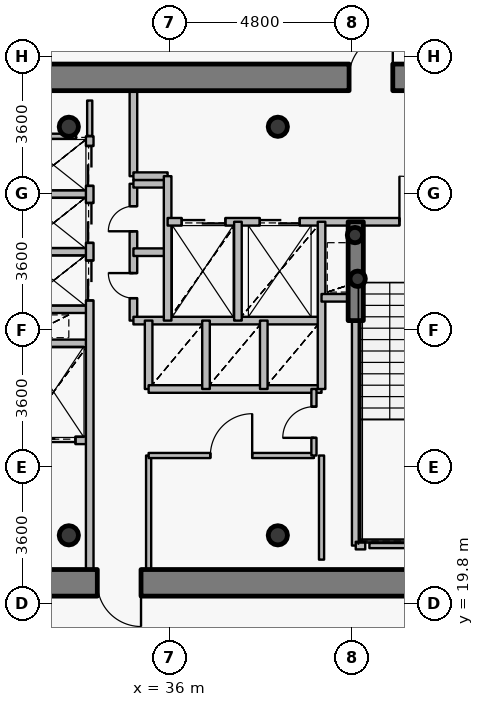
"""IFC4 building model, lengths in metres.
Left out: names, types, materials, properties, quantities, classifications, styles, units other than length and angle.
Written with IfcOpenShell. Run it as: python <this file> out.ifc"""

import sys

from ifc_helpers import new_model, si_unit, direction, frame, frame_2d, origin, origin_2d, place, context, subcontext, project, spatial, rectangle, hollow_circle, extrude, source, transform, mapped, element, fill, save


model = new_model("IFC4")
c1 = context("Model", 3, precision=1e-05, world=origin(), true_north=direction((0.0, 1.0)))
c2 = subcontext(c1, "Body", "Model", "MODEL_VIEW")
j1 = project(units=[si_unit("LENGTHUNIT", "METRE"), si_unit("PLANEANGLEUNIT", "RADIAN")], contexts=[c1])
p1 = place(None, origin())
s1 = spatial("IfcSite", under=j1, at=p1, CompositionType="ELEMENT")
p2 = place(p1, origin())
s2 = spatial("IfcBuilding", under=s1, at=p2, CompositionType="ELEMENT")
p3 = place(p2, frame((0.0, 0.0, 255.3)))
s3 = spatial("IfcBuildingStorey", under=s2, at=p3, CompositionType="ELEMENT", Elevation=255.3)
for number, where, z_axis, x_axis in (
    (1, (33.35, 21.6, 0.0), (0.0, 0.0, 1.0), (1.0, 0.0, 0.0)),
    (2, (38.85, 21.6, 0.0), (0.0, 0.0, 1.0), (1.0, 0.0, 0.0)),
    (3, (38.85, 32.35, 0.0), (0.0, 0.0, 1.0), (1.0, 0.0, 0.0)),
    (4, (33.35, 32.35, 0.0), (0.0, 0.0, 1.0), (1.0, 0.0, 0.0)),
):
    element("IfcColumn", number, at=place(p3, frame(where, z_axis=z_axis, x_axis=x_axis)), inside=s3, PredefinedType="COLUMN", context=c2, shape_type="SweptSolid", body=[
        extrude(hollow_circle(Radius=0.254, WallThickness=0.02, at=origin_2d()), origin(), (0.0, 0.0, 1.0), 3.75),
    ])
for number, where, z_axis, x_axis in (
    (5, (40.95, 28.35, 0.0), (0.0, 0.0, 1.0), (1.0, 0.0, 0.0)),
    (6, (40.88, 29.5, 0.0), (0.0, 0.0, 1.0), (1.0, 0.0, 0.0)),
):
    element("IfcColumn", number, at=place(p3, frame(where, z_axis=z_axis, x_axis=x_axis)), inside=s3, PredefinedType="COLUMN", context=c2, shape_type="SweptSolid", body=[
        extrude(hollow_circle(Radius=0.203, WallThickness=0.016, at=origin_2d()), origin(), (0.0, 0.0, 1.0), 3.75),
    ])
p4 = place(p3, frame((27.05, 33.65, 0.0), z_axis=(0.0, 0.0, 1.0), x_axis=(1.0, 0.0, 0.0)))
e7 = element("IfcWall", 7, at=p4, inside=s3, PredefinedType="SHEAR", context=c2, shape_type="SweptSolid", body=[
    extrude(rectangle(XDim=17.9, YDim=0.7, at=frame_2d((8.95, 0.0))), origin(), (0.0, 0.0, 1.0), 3.05),
])
p5 = place(p4, frame((13.675, 0.0, 0.0)))
e8 = element("IfcOpeningElement", 8, at=p5, cuts=e7, PredefinedType="OPENING", context=c2, shape_type="SweptSolid", body=[
    extrude(rectangle(XDim=1.15, YDim=2.15, at=origin_2d()), frame((0.575, 0.36, 1.075), z_axis=(0.0, -1.0, 0.0), x_axis=(1.0, 0.0, 0.0)), (0.0, 0.0, 1.0), 0.72),
])
p6 = place(p3, frame((44.95, 20.35, 0.0), z_axis=(0.0, 0.0, 1.0), x_axis=(-1.0, 0.0, 0.0)))
e9 = element("IfcWall", 9, at=p6, inside=s3, PredefinedType="SHEAR", context=c2, shape_type="SweptSolid", body=[
    extrude(rectangle(XDim=17.9, YDim=0.7, at=frame_2d((8.95, 0.0))), origin(), (0.0, 0.0, 1.0), 3.05),
])
p7 = place(p6, frame((9.7, 0.0, 0.0)))
e10 = element("IfcOpeningElement", 10, at=p7, cuts=e9, PredefinedType="OPENING", context=c2, shape_type="SweptSolid", body=[
    extrude(rectangle(XDim=1.15, YDim=2.15, at=origin_2d()), frame((0.575, 0.36, 1.075), z_axis=(0.0, -1.0, 0.0), x_axis=(1.0, 0.0, 0.0)), (0.0, 0.0, 1.0), 0.72),
])
p8 = place(p3, frame((40.9, 27.25, 0.0), z_axis=(0.0, 0.0, 1.0), x_axis=(0.0, 1.0, 0.0)))
e11 = element("IfcWall", 11, at=p8, inside=s3, PredefinedType="SHEAR", context=c2, shape_type="SweptSolid", body=[
    extrude(rectangle(XDim=2.6, YDim=0.4, at=frame_2d((1.3, 0.0))), origin(), (0.0, 0.0, 1.0), 3.1),
])
p9 = place(p3, frame((32.0, 24.1, 0.0), z_axis=(0.0, 0.0, 1.0), x_axis=(1.0, 0.0, 0.0)))
e12 = element("IfcWall", 12, at=p9, inside=s3, PredefinedType="PARTITIONING", context=c2, shape_type="SweptSolid", body=[
    extrude(rectangle(XDim=1.9, YDim=0.2, at=frame_2d((0.95, 0.0))), origin(), (0.0, 0.0, 1.0), 3.085),
])
p10 = place(p9, frame((0.375, 0.0, 0.0)))
e13 = element("IfcOpeningElement", 13, at=p10, cuts=e12, PredefinedType="OPENING", context=c2, shape_type="SweptSolid", body=[
    extrude(rectangle(XDim=1.15, YDim=2.15, at=origin_2d()), frame((0.575, 0.11, 1.075), z_axis=(0.0, -1.0, 0.0), x_axis=(1.0, 0.0, 0.0)), (0.0, 0.0, 1.0), 0.22),
])
for number, where, z_axis, x_axis in (
    (14, (32.0, 26.65, 0.0), (0.0, 0.0, 1.0), (1.0, 0.0, 0.0)),
    (15, (32.0, 27.55, 0.0), (0.0, 0.0, 1.0), (1.0, 0.0, 0.0)),
    (16, (32.0, 29.06, 0.0), (0.0, 0.0, 1.0), (1.0, 0.0, 0.0)),
    (17, (32.0, 30.58, 0.0), (0.0, 0.0, 1.0), (1.0, 0.0, 0.0)),
):
    element("IfcWall", number, at=place(p3, frame(where, z_axis=z_axis, x_axis=x_axis)), inside=s3, PredefinedType="PARTITIONING", context=c2, shape_type="SweptSolid", body=[
        extrude(rectangle(XDim=1.9, YDim=0.2, at=frame_2d((0.95, 0.0))), origin(), (0.0, 0.0, 1.0), 3.085),
    ])
p11 = place(p3, frame((33.9, 20.7, 0.0), z_axis=(0.0, 0.0, 1.0), x_axis=(0.0, 1.0, 0.0)))
e18 = element("IfcWall", 18, at=p11, inside=s3, PredefinedType="PARTITIONING", context=c2, shape_type="SweptSolid", body=[
    extrude(rectangle(XDim=11.4, YDim=0.2, at=frame_2d((5.7, 0.0))), origin(), (0.0, 0.0, 1.0), 3.085),
])
p12 = place(p11, frame((7.08, 0.0, 0.0)))
e19 = element("IfcOpeningElement", 19, at=p12, cuts=e18, PredefinedType="OPENING", context=c2, shape_type="SweptSolid", body=[
    extrude(rectangle(XDim=1.05, YDim=2.15, at=origin_2d()), frame((0.525, 0.11, 1.075), z_axis=(0.0, -1.0, 0.0), x_axis=(1.0, 0.0, 0.0)), (0.0, 0.0, 1.0), 0.22),
])
p13 = place(p11, frame((8.595, 0.0, 0.0)))
e20 = element("IfcOpeningElement", 20, at=p13, cuts=e18, PredefinedType="OPENING", context=c2, shape_type="SweptSolid", body=[
    extrude(rectangle(XDim=1.05, YDim=2.15, at=origin_2d()), frame((0.525, 0.11, 1.075), z_axis=(0.0, -1.0, 0.0), x_axis=(1.0, 0.0, 0.0)), (0.0, 0.0, 1.0), 0.22),
])
p14 = place(p11, frame((10.095, 0.0, 0.0)))
e21 = element("IfcOpeningElement", 21, at=p14, cuts=e18, PredefinedType="OPENING", context=c2, shape_type="SweptSolid", body=[
    extrude(rectangle(XDim=1.05, YDim=2.15, at=origin_2d()), frame((0.525, 0.11, 1.075), z_axis=(0.0, -1.0, 0.0), x_axis=(1.0, 0.0, 0.0)), (0.0, 0.0, 1.0), 0.22),
])
p15 = place(p3, frame((35.05, 27.25, 0.0), z_axis=(0.0, 0.0, 1.0), x_axis=(0.0, 1.0, 0.0)))
e22 = element("IfcWall", 22, at=p15, inside=s3, PredefinedType="PARTITIONING", context=c2, shape_type="SweptSolid", body=[
    extrude(rectangle(XDim=3.6, YDim=0.2, at=frame_2d((1.8, 0.0))), origin(), (0.0, 0.0, 1.0), 3.5),
])
p16 = place(p15, frame((0.59, 0.0, 0.0)))
e23 = element("IfcOpeningElement", 23, at=p16, cuts=e22, PredefinedType="OPENING", context=c2, shape_type="SweptSolid", body=[
    extrude(rectangle(XDim=0.66, YDim=2.05, at=origin_2d()), frame((0.33, 0.11, 1.025), z_axis=(0.0, -1.0, 0.0), x_axis=(1.0, 0.0, 0.0)), (0.0, 0.0, 1.0), 0.22),
])
p17 = place(p15, frame((2.35, 0.0, 0.0)))
e24 = element("IfcOpeningElement", 24, at=p17, cuts=e22, PredefinedType="OPENING", context=c2, shape_type="SweptSolid", body=[
    extrude(rectangle(XDim=0.66, YDim=2.05, at=origin_2d()), frame((0.33, 0.11, 1.025), z_axis=(0.0, -1.0, 0.0), x_axis=(1.0, 0.0, 0.0)), (0.0, 0.0, 1.0), 0.22),
])
p18 = place(p3, frame((35.05, 27.25, 0.0), z_axis=(0.0, 0.0, 1.0), x_axis=(1.0, 0.0, 0.0)))
e25 = element("IfcWall", 25, at=p18, inside=s3, PredefinedType="PARTITIONING", context=c2, shape_type="SweptSolid", body=[
    extrude(rectangle(XDim=4.95, YDim=0.2, at=frame_2d((2.475, 0.0))), origin(), (0.0, 0.0, 1.0), 3.085),
])
for number, where, z_axis, x_axis in (
    (26, (35.05, 29.05, 0.0), (0.0, 0.0, 1.0), (1.0, 0.0, 0.0)),
    (27, (35.05, 30.85, 0.0), (0.0, 0.0, 1.0), (1.0, 0.0, 0.0)),
):
    element("IfcWall", number, at=place(p3, frame(where, z_axis=z_axis, x_axis=x_axis)), inside=s3, PredefinedType="PARTITIONING", context=c2, shape_type="SweptSolid", body=[
        extrude(rectangle(XDim=0.9, YDim=0.2, at=frame_2d((0.45, 0.0))), origin(), (0.0, 0.0, 1.0), 3.5),
    ])
p19 = place(p3, frame((35.05, 31.05, 0.0), z_axis=(0.0, 0.0, 1.0), x_axis=(0.0, 1.0, 0.0)))
e28 = element("IfcWall", 28, at=p19, inside=s3, PredefinedType="PARTITIONING", context=c2, shape_type="SweptSolid", body=[
    extrude(rectangle(XDim=2.25, YDim=0.2, at=frame_2d((1.125, 0.0))), origin(), (0.0, 0.0, 1.0), 3.085),
])
p20 = place(p3, frame((35.05, 31.05, 0.0), z_axis=(0.0, 0.0, 1.0), x_axis=(1.0, 0.0, 0.0)))
e29 = element("IfcWall", 29, at=p20, inside=s3, PredefinedType="PARTITIONING", context=c2, shape_type="SweptSolid", body=[
    extrude(rectangle(XDim=0.9, YDim=0.2, at=frame_2d((0.45, 0.0))), origin(), (0.0, 0.0, 1.0), 3.5),
])
p21 = place(p3, frame((35.45, 20.7, 0.0), z_axis=(0.0, 0.0, 1.0), x_axis=(0.0, 1.0, 0.0)))
e30 = element("IfcWall", 30, at=p21, inside=s3, PredefinedType="PARTITIONING", context=c2, shape_type="SweptSolid", body=[
    extrude(rectangle(XDim=3.0, YDim=0.135, at=frame_2d((1.5, 0.0))), origin(), (0.0, 0.0, 1.0), 3.085),
])
p22 = place(p3, frame((35.45, 23.7, 0.0), z_axis=(0.0, 0.0, 1.0), x_axis=(1.0, 0.0, 0.0)))
e31 = element("IfcWall", 31, at=p22, inside=s3, PredefinedType="PARTITIONING", context=c2, shape_type="SweptSolid", body=[
    extrude(rectangle(XDim=4.35, YDim=0.135, at=frame_2d((2.175, 0.0))), origin(), (0.0, 0.0, 1.0), 3.085),
])
p23 = place(p22, frame((1.625, 0.0, 0.0)))
e32 = element("IfcOpeningElement", 32, at=p23, cuts=e31, PredefinedType="OPENING", context=c2, shape_type="SweptSolid", body=[
    extrude(rectangle(XDim=1.1, YDim=2.15, at=origin_2d()), frame((0.55, 0.078, 1.075), z_axis=(0.0, -1.0, 0.0), x_axis=(1.0, 0.0, 0.0)), (0.0, 0.0, 1.0), 0.155),
])
p24 = place(p3, frame((35.45, 25.45, 0.0), z_axis=(0.0, 0.0, 1.0), x_axis=(0.0, 1.0, 0.0)))
e33 = element("IfcWall", 33, at=p24, inside=s3, PredefinedType="PARTITIONING", context=c2, shape_type="SweptSolid", body=[
    extrude(rectangle(XDim=1.8, YDim=0.2, at=frame_2d((0.9, 0.0))), origin(), (0.0, 0.0, 1.0), 3.5),
])
p25 = place(p3, frame((35.45, 25.45, 0.0), z_axis=(0.0, 0.0, 1.0), x_axis=(1.0, 0.0, 0.0)))
e34 = element("IfcWall", 34, at=p25, inside=s3, PredefinedType="PARTITIONING", context=c2, shape_type="SweptSolid", body=[
    extrude(rectangle(XDim=4.55, YDim=0.2, at=frame_2d((2.275, 0.0))), origin(), (0.0, 0.0, 1.0), 3.085),
])
p26 = place(p3, frame((35.95, 27.25, 0.0), z_axis=(0.0, 0.0, 1.0), x_axis=(0.0, 1.0, 0.0)))
e35 = element("IfcWall", 35, at=p26, inside=s3, PredefinedType="PARTITIONING", context=c2, shape_type="SweptSolid", body=[
    extrude(rectangle(XDim=3.8, YDim=0.2, at=frame_2d((1.9, 0.0))), origin(), (0.0, 0.0, 1.0), 3.5),
])
p27 = place(p3, frame((35.95, 29.85, 0.0), z_axis=(0.0, 0.0, 1.0), x_axis=(1.0, 0.0, 0.0)))
e36 = element("IfcWall", 36, at=p27, inside=s3, PredefinedType="PARTITIONING", context=c2, shape_type="SweptSolid", body=[
    extrude(rectangle(XDim=8.49, YDim=0.2, at=frame_2d((4.245, 0.0))), origin(), (0.0, 0.0, 1.0), 3.085),
])
p28 = place(p27, frame((6.1, 0.0, 0.0)))
e37 = element("IfcOpeningElement", 37, at=p28, cuts=e36, PredefinedType="OPENING", context=c2, shape_type="SweptSolid", body=[
    extrude(rectangle(XDim=1.2, YDim=2.15, at=origin_2d()), frame((0.6, 0.11, 1.075), z_axis=(0.0, -1.0, 0.0), x_axis=(1.0, 0.0, 0.0)), (0.0, 0.0, 1.0), 0.22),
])
p29 = place(p27, frame((0.37, 0.0, 0.0)))
e38 = element("IfcOpeningElement", 38, at=p29, cuts=e36, PredefinedType="OPENING", context=c2, shape_type="SweptSolid", body=[
    extrude(rectangle(XDim=1.15, YDim=2.15, at=origin_2d()), frame((0.575, 0.11, 1.075), z_axis=(0.0, -1.0, 0.0), x_axis=(1.0, 0.0, 0.0)), (0.0, 0.0, 1.0), 0.22),
])
p30 = place(p27, frame((2.425, 0.0, 0.0)))
e39 = element("IfcOpeningElement", 39, at=p30, cuts=e36, PredefinedType="OPENING", context=c2, shape_type="SweptSolid", body=[
    extrude(rectangle(XDim=1.05, YDim=2.15, at=origin_2d()), frame((0.525, 0.11, 1.075), z_axis=(0.0, -1.0, 0.0), x_axis=(1.0, 0.0, 0.0)), (0.0, 0.0, 1.0), 0.22),
])
p31 = place(p3, frame((36.96, 25.45, 0.0), z_axis=(0.0, 0.0, 1.0), x_axis=(0.0, 1.0, 0.0)))
e40 = element("IfcWall", 40, at=p31, inside=s3, PredefinedType="PARTITIONING", context=c2, shape_type="SweptSolid", body=[
    extrude(rectangle(XDim=1.8, YDim=0.2, at=frame_2d((0.9, 0.0))), origin(), (0.0, 0.0, 1.0), 3.5),
])
p32 = place(p3, frame((37.8, 27.25, 0.0), z_axis=(0.0, 0.0, 1.0), x_axis=(0.0, 1.0, 0.0)))
e41 = element("IfcWall", 41, at=p32, inside=s3, PredefinedType="PARTITIONING", context=c2, shape_type="SweptSolid", body=[
    extrude(rectangle(XDim=2.6, YDim=0.2, at=frame_2d((1.3, 0.0))), origin(), (0.0, 0.0, 1.0), 3.5),
])
p33 = place(p3, frame((38.48, 25.45, 0.0), z_axis=(0.0, 0.0, 1.0), x_axis=(0.0, 1.0, 0.0)))
e42 = element("IfcWall", 42, at=p33, inside=s3, PredefinedType="PARTITIONING", context=c2, shape_type="SweptSolid", body=[
    extrude(rectangle(XDim=1.8, YDim=0.2, at=frame_2d((0.9, 0.0))), origin(), (0.0, 0.0, 1.0), 3.5),
])
p34 = place(p3, frame((39.8, 23.7, 0.0), z_axis=(0.0, 0.0, 1.0), x_axis=(0.0, 1.0, 0.0)))
e43 = element("IfcWall", 43, at=p34, inside=s3, PredefinedType="PARTITIONING", context=c2, shape_type="SweptSolid", body=[
    extrude(rectangle(XDim=1.75, YDim=0.135, at=frame_2d((0.875, 0.0))), origin(), (0.0, 0.0, 1.0), 3.5),
])
p35 = place(p34, frame((0.465, 0.0, 0.0)))
e44 = element("IfcOpeningElement", 44, at=p35, cuts=e43, PredefinedType="OPENING", context=c2, shape_type="SweptSolid", body=[
    extrude(rectangle(XDim=0.82, YDim=2.1, at=origin_2d()), frame((0.41, 0.078, 1.05), z_axis=(0.0, -1.0, 0.0), x_axis=(1.0, 0.0, 0.0)), (0.0, 0.0, 1.0), 0.155),
])
p36 = place(p3, frame((40.0, 25.45, 0.0), z_axis=(0.0, 0.0, 1.0), x_axis=(0.0, 1.0, 0.0)))
e45 = element("IfcWall", 45, at=p36, inside=s3, PredefinedType="PARTITIONING", context=c2, shape_type="SweptSolid", body=[
    extrude(rectangle(XDim=4.4, YDim=0.2, at=frame_2d((2.2, 0.0))), origin(), (0.0, 0.0, 1.0), 3.5),
])
p37 = place(p3, frame((40.0, 27.85, 0.0), z_axis=(0.0, 0.0, 1.0), x_axis=(1.0, 0.0, 0.0)))
e46 = element("IfcWall", 46, at=p37, inside=s3, PredefinedType="PARTITIONING", context=c2, shape_type="SweptSolid", body=[
    extrude(rectangle(XDim=0.9, YDim=0.2, at=frame_2d((0.45, 0.0))), origin(), (0.0, 0.0, 1.0), 3.5),
])
p38 = place(p3, frame((40.9, 21.33, 0.0), z_axis=(0.0, 0.0, 1.0), x_axis=(0.0, 1.0, 0.0)))
e47 = element("IfcWall", 47, at=p38, inside=s3, PredefinedType="PARTITIONING", context=c2, shape_type="SweptSolid", body=[
    extrude(rectangle(XDim=5.91, YDim=0.2, at=frame_2d((2.955, 0.0))), origin(), (0.0, 0.0, 1.0), 3.035),
])
p39 = place(p3, frame((40.9, 21.33, 0.0), z_axis=(0.0, 0.0, 1.0), x_axis=(1.0, 0.0, 0.0)))
e48 = element("IfcWall", 48, at=p39, inside=s3, PredefinedType="PARTITIONING", context=c2, shape_type="SweptSolid", body=[
    extrude(rectangle(XDim=0.25, YDim=0.2, at=frame_2d((0.125, 0.0))), origin(), (0.0, 0.0, 1.0), 3.035),
])
p40 = place(p3, frame((44.08, 21.33, 0.0), z_axis=(0.0, 0.0, 1.0), x_axis=(-1.0, 0.0, 0.0)))
e49 = element("IfcWall", 49, at=p40, inside=s3, PredefinedType="PARTITIONING", context=c2, shape_type="SweptSolid", body=[
    extrude(rectangle(XDim=2.82, YDim=0.135, at=frame_2d((1.41, 0.0))), origin(), (0.0, 0.0, 1.0), 3.035),
])
p41 = place(p3, frame((32.36, 32.1, 0.0), z_axis=(0.0, 0.0, 1.0), x_axis=(1.0, 0.0, 0.0)))
e50 = element("IfcWall", 50, at=p41, inside=s3, PredefinedType="PARTITIONING", context=c2, shape_type="SweptSolid", body=[
    extrude(rectangle(XDim=1.18, YDim=0.135, at=frame_2d((0.59, 0.0))), origin(), (0.0, 0.0, 1.0), 3.085),
])
p42 = place(p3, frame((40.0, 23.7, 0.0), z_axis=(0.0, 0.0, 1.0), x_axis=(0.0, -1.0, 0.0)))
e51 = element("IfcWall", 51, at=p42, inside=s3, PredefinedType="PARTITIONING", context=c2, shape_type="SweptSolid", body=[
    extrude(rectangle(XDim=2.74, YDim=0.135, at=frame_2d((1.37, 0.0))), origin(), (0.0, 0.0, 1.0), 3.035),
])
p43 = place(p3, frame((33.9, 32.11, 0.0), z_axis=(0.0, 0.0, 1.0), x_axis=(0.0, 1.0, 0.0)))
e52 = element("IfcWall", 52, at=p43, inside=s3, PredefinedType="PARTITIONING", context=c2, shape_type="SweptSolid", body=[
    extrude(rectangle(XDim=0.93, YDim=0.135, at=frame_2d((0.465, 0.0))), origin(), (0.0, 0.0, 1.0), 3.085),
])
m1 = source(origin(), c2, "Body", "SweptSolid", [
    extrude(rectangle(XDim=1.15, YDim=2.15, at=origin_2d()), frame((0.575, 0.025, 1.075), z_axis=(0.0, -1.0, 0.0), x_axis=(1.0, 0.0, 0.0)), (0.0, 0.0, 1.0), 0.05),
])
p44 = place(p5, origin())
e53 = element("IfcDoor", 53, at=p44, inside=s3, OperationType="SINGLE_SWING_RIGHT", PredefinedType="DOOR", context=c2, shape_type="MappedRepresentation", body=[
    mapped(m1, transform((0.0, 0.0, 0.0), x_axis=(1.0, 0.0, 0.0), y_axis=(0.0, 1.0, 0.0), z_axis=(0.0, 0.0, 1.0), scale=1.0)),
])
fill(e8, e53)
p45 = place(p7, origin())
e54 = element("IfcDoor", 54, at=p45, inside=s3, OperationType="SINGLE_SWING_LEFT", PredefinedType="DOOR", context=c2, shape_type="MappedRepresentation", body=[
    mapped(m1, transform((0.0, 0.0, 0.0), x_axis=(1.0, 0.0, 0.0), y_axis=(0.0, 1.0, 0.0), z_axis=(0.0, 0.0, 1.0), scale=1.0)),
])
fill(e10, e54)
m2 = source(origin(), c2, "Body", "SweptSolid", [
    extrude(rectangle(XDim=1.2, YDim=2.15, at=origin_2d()), frame((0.6, 0.025, 1.075), z_axis=(0.0, -1.0, 0.0), x_axis=(1.0, 0.0, 0.0)), (0.0, 0.0, 1.0), 0.05),
])
p46 = place(p28, origin())
e55 = element("IfcDoor", 55, at=p46, inside=s3, OperationType="SINGLE_SWING_LEFT", PredefinedType="DOOR", context=c2, shape_type="MappedRepresentation", body=[
    mapped(m2, transform((0.0, 0.0, 0.0), x_axis=(1.0, 0.0, 0.0), y_axis=(0.0, 1.0, 0.0), z_axis=(0.0, 0.0, 1.0), scale=1.0)),
])
fill(e37, e55)
m3 = source(origin(), c2, "Body", "SweptSolid", [
    extrude(rectangle(XDim=1.15, YDim=2.15, at=origin_2d()), frame((0.575, 0.025, 1.075), z_axis=(0.0, -1.0, 0.0), x_axis=(1.0, 0.0, 0.0)), (0.0, 0.0, 1.0), 0.05),
])
p47 = place(p29, origin())
e56 = element("IfcDoor", 56, at=p47, inside=s3, OperationType="DOUBLE_DOOR_SLIDING", PredefinedType="USERDEFINED", context=c2, shape_type="MappedRepresentation", body=[
    mapped(m3, transform((0.0, 0.0, 0.0), x_axis=(1.0, 0.0, 0.0), y_axis=(0.0, 1.0, 0.0), z_axis=(0.0, 0.0, 1.0), scale=1.0)),
])
fill(e38, e56)
p48 = place(p10, origin())
e57 = element("IfcDoor", 57, at=p48, inside=s3, OperationType="DOUBLE_DOOR_SLIDING", PredefinedType="USERDEFINED", context=c2, shape_type="MappedRepresentation", body=[
    mapped(m3, transform((0.0, 0.0, 0.0), x_axis=(1.0, 0.0, 0.0), y_axis=(0.0, 1.0, 0.0), z_axis=(0.0, 0.0, 1.0), scale=1.0)),
])
fill(e13, e57)
m4 = source(origin(), c2, "Body", "SweptSolid", [
    extrude(rectangle(XDim=1.05, YDim=2.15, at=origin_2d()), frame((0.525, 0.025, 1.075), z_axis=(0.0, -1.0, 0.0), x_axis=(1.0, 0.0, 0.0)), (0.0, 0.0, 1.0), 0.05),
])
p49 = place(p30, origin())
e58 = element("IfcDoor", 58, at=p49, inside=s3, OperationType="DOUBLE_DOOR_SLIDING", PredefinedType="USERDEFINED", context=c2, shape_type="MappedRepresentation", body=[
    mapped(m4, transform((0.0, 0.0, 0.0), x_axis=(1.0, 0.0, 0.0), y_axis=(0.0, 1.0, 0.0), z_axis=(0.0, 0.0, 1.0), scale=1.0)),
])
fill(e39, e58)
p50 = place(p12, origin())
e59 = element("IfcDoor", 59, at=p50, inside=s3, OperationType="DOUBLE_DOOR_SLIDING", PredefinedType="USERDEFINED", context=c2, shape_type="MappedRepresentation", body=[
    mapped(m4, transform((0.0, 0.0, 0.0), x_axis=(1.0, 0.0, 0.0), y_axis=(0.0, 1.0, 0.0), z_axis=(0.0, 0.0, 1.0), scale=1.0)),
])
fill(e19, e59)
p51 = place(p13, origin())
e60 = element("IfcDoor", 60, at=p51, inside=s3, OperationType="DOUBLE_DOOR_SLIDING", PredefinedType="USERDEFINED", context=c2, shape_type="MappedRepresentation", body=[
    mapped(m4, transform((0.0, 0.0, 0.0), x_axis=(1.0, 0.0, 0.0), y_axis=(0.0, 1.0, 0.0), z_axis=(0.0, 0.0, 1.0), scale=1.0)),
])
fill(e20, e60)
p52 = place(p14, origin())
e61 = element("IfcDoor", 61, at=p52, inside=s3, OperationType="DOUBLE_DOOR_SLIDING", PredefinedType="USERDEFINED", context=c2, shape_type="MappedRepresentation", body=[
    mapped(m4, transform((0.0, 0.0, 0.0), x_axis=(1.0, 0.0, 0.0), y_axis=(0.0, 1.0, 0.0), z_axis=(0.0, 0.0, 1.0), scale=1.0)),
])
fill(e21, e61)
m5 = source(origin(), c2, "Body", "SweptSolid", [
    extrude(rectangle(XDim=0.66, YDim=2.05, at=origin_2d()), frame((0.33, 0.025, 1.025), z_axis=(0.0, -1.0, 0.0), x_axis=(1.0, 0.0, 0.0)), (0.0, 0.0, 1.0), 0.05),
])
p53 = place(p16, origin())
e62 = element("IfcDoor", 62, at=p53, inside=s3, OperationType="SINGLE_SWING_RIGHT", PredefinedType="USERDEFINED", context=c2, shape_type="MappedRepresentation", body=[
    mapped(m5, transform((0.0, 0.0, 0.0), x_axis=(1.0, 0.0, 0.0), y_axis=(0.0, 1.0, 0.0), z_axis=(0.0, 0.0, 1.0), scale=1.0)),
])
fill(e23, e62)
p54 = place(p17, origin())
e63 = element("IfcDoor", 63, at=p54, inside=s3, OperationType="SINGLE_SWING_LEFT", PredefinedType="USERDEFINED", context=c2, shape_type="MappedRepresentation", body=[
    mapped(m5, transform((0.0, 0.0, 0.0), x_axis=(1.0, 0.0, 0.0), y_axis=(0.0, 1.0, 0.0), z_axis=(0.0, 0.0, 1.0), scale=1.0)),
])
fill(e24, e63)
m6 = source(origin(), c2, "Body", "SweptSolid", [
    extrude(rectangle(XDim=1.1, YDim=2.15, at=origin_2d()), frame((0.55, 0.025, 1.075), z_axis=(0.0, -1.0, 0.0), x_axis=(1.0, 0.0, 0.0)), (0.0, 0.0, 1.0), 0.05),
])
p55 = place(p23, origin())
e64 = element("IfcDoor", 64, at=p55, inside=s3, OperationType="SINGLE_SWING_RIGHT", PredefinedType="DOOR", context=c2, shape_type="MappedRepresentation", body=[
    mapped(m6, transform((0.0, 0.0, 0.0), x_axis=(1.0, 0.0, 0.0), y_axis=(0.0, 1.0, 0.0), z_axis=(0.0, 0.0, 1.0), scale=1.0)),
])
fill(e32, e64)
m7 = source(origin(), c2, "Body", "SweptSolid", [
    extrude(rectangle(XDim=0.82, YDim=2.1, at=origin_2d()), frame((0.41, 0.025, 1.05), z_axis=(0.0, -1.0, 0.0), x_axis=(1.0, 0.0, 0.0)), (0.0, 0.0, 1.0), 0.05),
])
p56 = place(p35, origin())
e65 = element("IfcDoor", 65, at=p56, inside=s3, OperationType="SINGLE_SWING_LEFT", PredefinedType="DOOR", context=c2, shape_type="MappedRepresentation", body=[
    mapped(m7, transform((0.0, 0.0, 0.0), x_axis=(1.0, 0.0, 0.0), y_axis=(0.0, 1.0, 0.0), z_axis=(0.0, 0.0, 1.0), scale=1.0)),
])
fill(e44, e65)
save(model, sys.argv[1])
